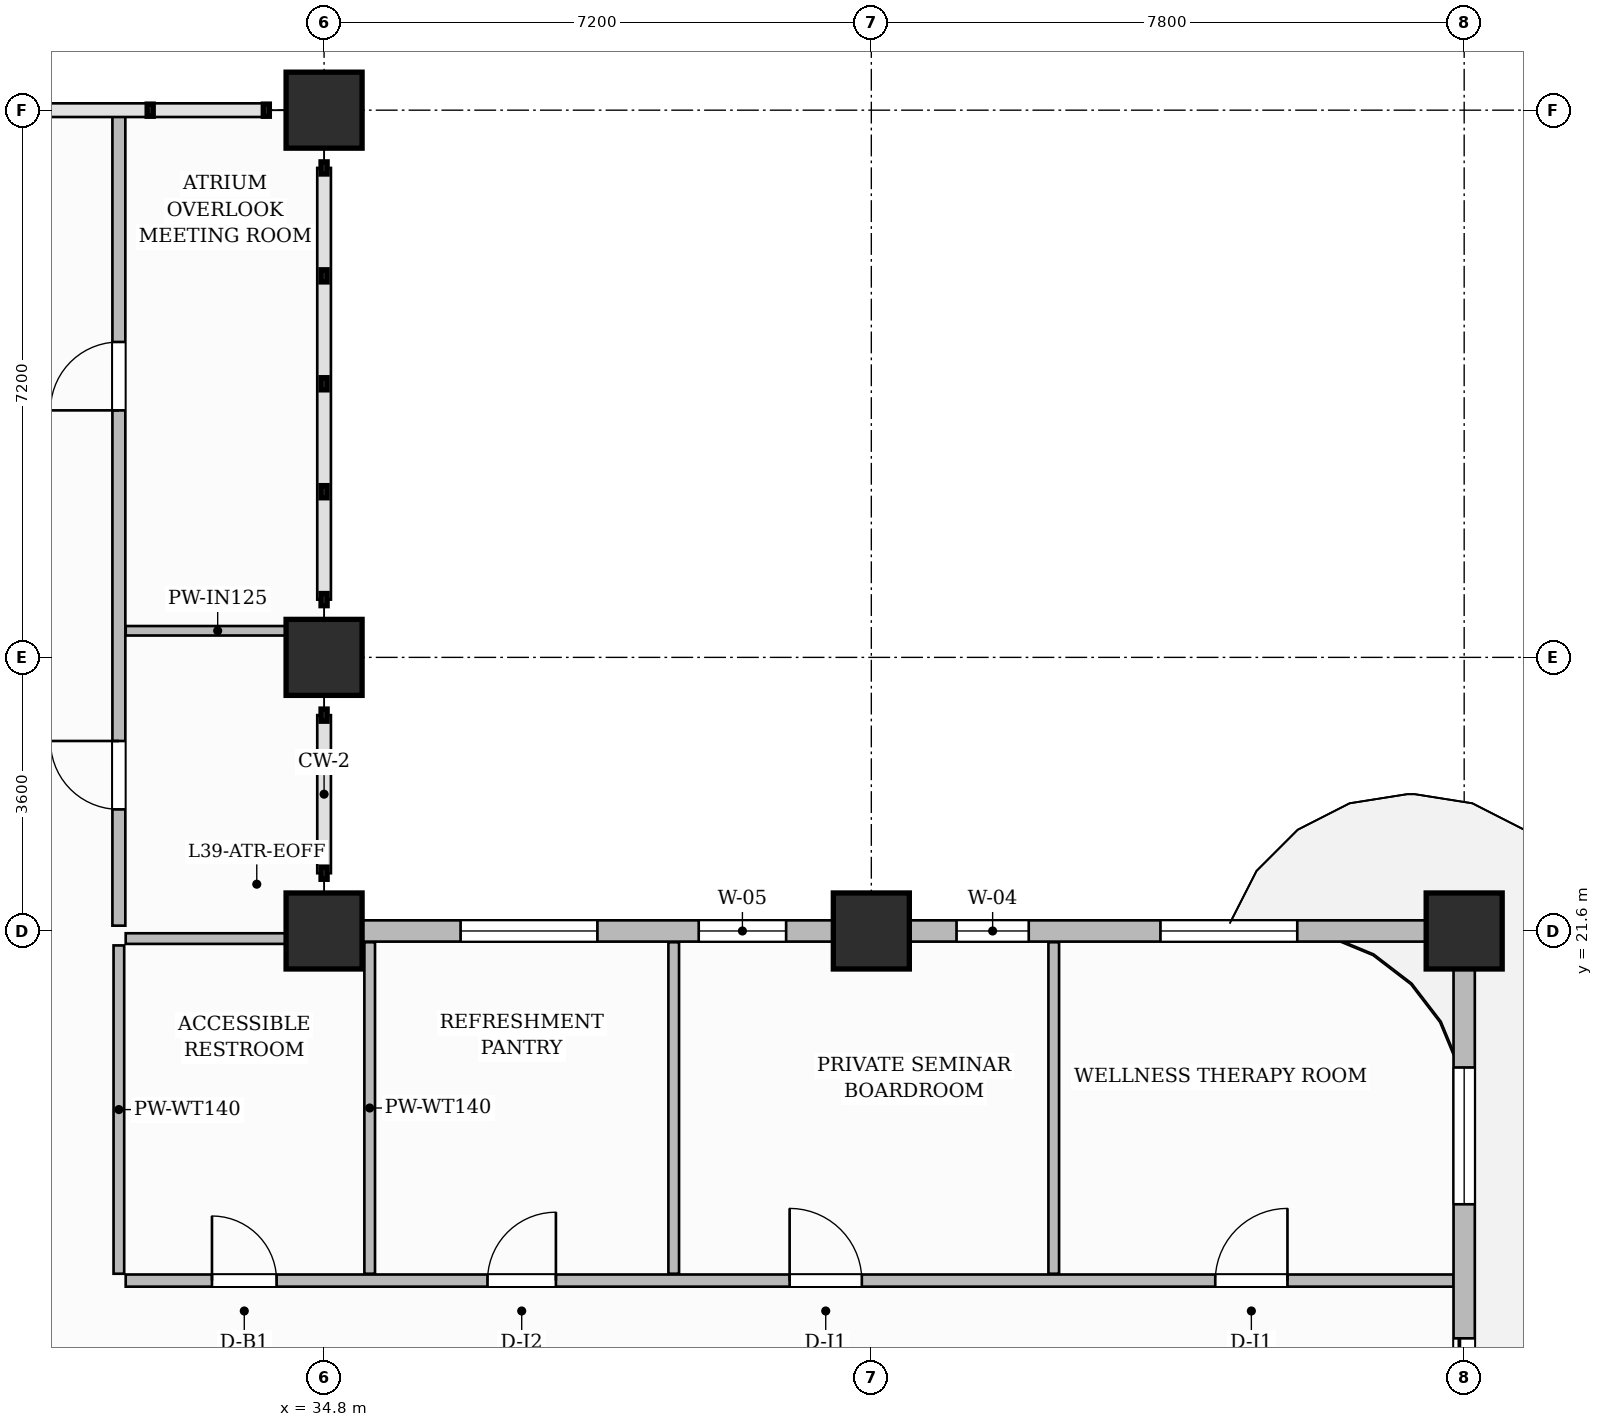
"""IFC4 building model, lengths in metres.
Left out: names, types, materials, properties, quantities, classifications, styles, units other than length and angle.
Written with IfcOpenShell. Run it as: python <this file> out.ifc"""

import sys

from ifc_helpers import new_model, si_unit, direction, frame, frame_2d, origin, origin_2d, place, context, subcontext, project, spatial, rectangle, extrude, source, transform, mapped, element, fill, save


model = new_model("IFC4")
c1 = context("Model", 3, precision=1e-05, world=origin(), true_north=direction((0.0, 1.0)))
c2 = subcontext(c1, "Body", "Model", "MODEL_VIEW")
j1 = project(units=[si_unit("LENGTHUNIT", "METRE"), si_unit("PLANEANGLEUNIT", "RADIAN")], contexts=[c1])
p1 = place(None, origin())
s1 = spatial("IfcSite", under=j1, at=p1, CompositionType="ELEMENT")
p2 = place(p1, origin())
s2 = spatial("IfcBuilding", under=s1, at=p2, CompositionType="ELEMENT")
p3 = place(p2, frame((0.0, 0.0, 158.0)))
s3 = spatial("IfcBuildingStorey", under=s2, at=p3, CompositionType="ELEMENT", Elevation=158.0)
m1 = source(origin(), c2, "Body", "SweptSolid", [
    extrude(rectangle(XDim=1.0, YDim=1.0, at=origin_2d()), origin(), (0.0, 0.0, 1.0), 3.85),
])
for number, where, z_axis, x_axis in (
    (1, (34.8, 21.6, 0.0), (0.0, 0.0, 1.0), (1.0, 0.0, 0.0)),
    (2, (34.8, 25.2, 0.0), (0.0, 0.0, 1.0), (1.0, 0.0, 0.0)),
    (3, (34.8, 32.4, 0.0), (0.0, 0.0, 1.0), (1.0, 0.0, 0.0)),
    (4, (42.0, 21.6, 0.0), (0.0, 0.0, 1.0), (1.0, 0.0, 0.0)),
    (5, (49.8, 21.6, 0.0), (0.0, 0.0, 1.0), (1.0, 0.0, 0.0)),
):
    element("IfcColumn", number, at=place(p3, frame(where, z_axis=z_axis, x_axis=x_axis)), inside=s3, PredefinedType="COLUMN", context=c2, shape_type="MappedRepresentation", body=[
        mapped(m1, transform((0.0, 0.0, 0.0), scale=1.0)),
    ])
p4 = place(p3, frame((32.19, 17.0, 0.0), z_axis=(0.0, 0.0, 1.0), x_axis=(1.0, 0.0, 0.0)))
e6 = element("IfcWall", 6, at=p4, inside=s3, PredefinedType="PARTITIONING", context=c2, shape_type="SweptSolid", body=[
    extrude(rectangle(XDim=17.47, YDim=0.16, at=frame_2d((8.735, 0.0))), origin(), (0.0, 0.0, 1.0), 3.6),
])
p5 = place(p4, frame((1.135, 0.0, 0.0)))
e7 = element("IfcOpeningElement", 7, at=p5, cuts=e6, PredefinedType="OPENING", context=c2, shape_type="SweptSolid", body=[
    extrude(rectangle(XDim=0.85, YDim=2.1, at=frame_2d((0.425, 1.05))), frame((0.0, 0.09, 0.0), z_axis=(0.0, -1.0, 0.0), x_axis=(1.0, 0.0, 0.0)), (0.0, 0.0, 1.0), 0.18),
])
p6 = place(p4, frame((4.76, 0.0, 0.0)))
e8 = element("IfcOpeningElement", 8, at=p6, cuts=e6, PredefinedType="OPENING", context=c2, shape_type="SweptSolid", body=[
    extrude(rectangle(XDim=0.9, YDim=2.15, at=frame_2d((0.45, 1.075))), frame((0.0, 0.09, 0.0), z_axis=(0.0, -1.0, 0.0), x_axis=(1.0, 0.0, 0.0)), (0.0, 0.0, 1.0), 0.18),
])
p7 = place(p4, frame((8.735, 0.0, 0.0)))
e9 = element("IfcOpeningElement", 9, at=p7, cuts=e6, PredefinedType="OPENING", context=c2, shape_type="SweptSolid", body=[
    extrude(rectangle(XDim=0.95, YDim=2.15, at=frame_2d((0.475, 1.075))), frame((0.0, 0.09, 0.0), z_axis=(0.0, -1.0, 0.0), x_axis=(1.0, 0.0, 0.0)), (0.0, 0.0, 1.0), 0.18),
])
p8 = place(p4, frame((14.335, 0.0, 0.0)))
e10 = element("IfcOpeningElement", 10, at=p8, cuts=e6, PredefinedType="OPENING", context=c2, shape_type="SweptSolid", body=[
    extrude(rectangle(XDim=0.95, YDim=2.15, at=frame_2d((0.475, 1.075))), frame((0.0, 0.09, 0.0), z_axis=(0.0, -1.0, 0.0), x_axis=(1.0, 0.0, 0.0)), (0.0, 0.0, 1.0), 0.18),
])
p9 = place(p3, frame((32.1, 17.09, 0.0), z_axis=(0.0, 0.0, 1.0), x_axis=(0.0, 1.0, 0.0)))
e11 = element("IfcWall", 11, at=p9, inside=s3, PredefinedType="PARTITIONING", context=c2, shape_type="SweptSolid", body=[
    extrude(rectangle(XDim=4.32, YDim=0.14, at=frame_2d((2.16, 0.0))), origin(), (0.0, 0.0, 1.0), 3.6),
])
for number, where, z_axis, x_axis in (
    (12, (35.4, 17.09, 0.0), (0.0, 0.0, 1.0), (0.0, 1.0, 0.0)),
    (13, (39.4, 17.09, 0.0), (0.0, 0.0, 1.0), (0.0, 1.0, 0.0)),
    (14, (44.4, 17.09, 0.0), (0.0, 0.0, 1.0), (0.0, 1.0, 0.0)),
):
    element("IfcWall", number, at=place(p3, frame(where, z_axis=z_axis, x_axis=x_axis)), inside=s3, PredefinedType="PARTITIONING", context=c2, shape_type="SweptSolid", body=[
        extrude(rectangle(XDim=4.362, YDim=0.14, at=frame_2d((2.181, 0.0))), origin(), (0.0, 0.0, 1.0), 3.6),
    ])
p10 = place(p3, frame((32.19, 21.5, 0.0), z_axis=(0.0, 0.0, 1.0), x_axis=(1.0, 0.0, 0.0)))
e15 = element("IfcWall", 15, at=p10, inside=s3, PredefinedType="PARTITIONING", context=c2, shape_type="SweptSolid", body=[
    extrude(rectangle(XDim=2.42, YDim=0.14, at=frame_2d((1.21, 0.0))), origin(), (0.0, 0.0, 1.0), 3.085),
])
p11 = place(p3, frame((32.1, 21.67, 0.0), z_axis=(0.0, 0.0, 1.0), x_axis=(0.0, 1.0, 0.0)))
e16 = element("IfcWall", 16, at=p11, inside=s3, PredefinedType="PARTITIONING", context=c2, shape_type="SweptSolid", body=[
    extrude(rectangle(XDim=10.702, YDim=0.17, at=frame_2d((5.351, 0.0))), origin(), (0.0, 0.0, 1.0), 3.6),
])
p12 = place(p11, frame((1.53, 0.0, 0.0)))
e17 = element("IfcOpeningElement", 17, at=p12, cuts=e16, PredefinedType="OPENING", context=c2, shape_type="SweptSolid", body=[
    extrude(rectangle(XDim=0.9, YDim=2.15, at=frame_2d((0.45, 1.075))), frame((0.0, 0.095, 0.0), z_axis=(0.0, -1.0, 0.0), x_axis=(1.0, 0.0, 0.0)), (0.0, 0.0, 1.0), 0.19),
])
p13 = place(p11, frame((6.78, 0.0, 0.0)))
e18 = element("IfcOpeningElement", 18, at=p13, cuts=e16, PredefinedType="OPENING", context=c2, shape_type="SweptSolid", body=[
    extrude(rectangle(XDim=0.9, YDim=2.15, at=frame_2d((0.45, 1.075))), frame((0.0, 0.095, 0.0), z_axis=(0.0, -1.0, 0.0), x_axis=(1.0, 0.0, 0.0)), (0.0, 0.0, 1.0), 0.19),
])
p14 = place(p3, frame((32.19, 25.55, 0.0), z_axis=(0.0, 0.0, 1.0), x_axis=(1.0, 0.0, 0.0)))
e19 = element("IfcWall", 19, at=p14, inside=s3, PredefinedType="PARTITIONING", context=c2, shape_type="SweptSolid", body=[
    extrude(rectangle(XDim=2.42, YDim=0.125, at=frame_2d((1.21, 0.0))), origin(), (0.0, 0.0, 1.0), 3.6),
])
p15 = place(p3, frame((49.8, 14.62, 0.0), z_axis=(0.0, 0.0, 1.0), x_axis=(0.0, 1.0, 0.0)))
e20 = element("IfcWall", 20, at=p15, inside=s3, PredefinedType="SOLIDWALL", context=c2, shape_type="SweptSolid", body=[
    extrude(rectangle(XDim=6.93, YDim=0.28, at=frame_2d((3.465, 0.0))), origin(), (0.0, 0.0, 1.0), 3.085),
])
p16 = place(p15, frame((0.42, 0.0, 0.0)))
e21 = element("IfcOpeningElement", 21, at=p16, cuts=e20, PredefinedType="OPENING", context=c2, shape_type="SweptSolid", body=[
    extrude(rectangle(XDim=1.2, YDim=2.2, at=frame_2d((0.6, 1.1))), frame((0.0, 0.15, 0.0), z_axis=(0.0, -1.0, 0.0), x_axis=(1.0, 0.0, 0.0)), (0.0, 0.0, 1.0), 0.3),
])
p17 = place(p15, frame((3.384, 0.0, 0.8)))
e22 = element("IfcOpeningElement", 22, at=p17, cuts=e20, PredefinedType="OPENING", context=c2, shape_type="SweptSolid", body=[
    extrude(rectangle(XDim=1.8, YDim=1.85, at=frame_2d((0.9, 0.925))), frame((0.0, 0.15, 0.0), z_axis=(0.0, -1.0, 0.0), x_axis=(1.0, 0.0, 0.0)), (0.0, 0.0, 1.0), 0.3),
])
p18 = place(p3, frame((34.8, 21.6, 0.0), z_axis=(0.0, 0.0, 1.0), x_axis=(1.0, 0.0, 0.0)))
e23 = element("IfcWall", 23, at=p18, inside=s3, PredefinedType="SOLIDWALL", context=c2, shape_type="SweptSolid", body=[
    extrude(rectangle(XDim=15.0, YDim=0.28, at=frame_2d((7.5, 0.0))), origin(), (0.0, 0.0, 1.0), 3.085),
])
p19 = place(p18, frame((1.796, 0.0, 0.8)))
e24 = element("IfcOpeningElement", 24, at=p19, cuts=e23, PredefinedType="OPENING", context=c2, shape_type="SweptSolid", body=[
    extrude(rectangle(XDim=1.8, YDim=1.85, at=frame_2d((0.9, 0.925))), frame((0.0, 0.15, 0.0), z_axis=(0.0, -1.0, 0.0), x_axis=(1.0, 0.0, 0.0)), (0.0, 0.0, 1.0), 0.3),
])
p20 = place(p18, frame((4.929, 0.0, 0.8)))
e25 = element("IfcOpeningElement", 25, at=p20, cuts=e23, PredefinedType="OPENING", context=c2, shape_type="SweptSolid", body=[
    extrude(rectangle(XDim=1.15, YDim=1.8, at=frame_2d((0.575, 0.9))), frame((0.0, 0.15, 0.0), z_axis=(0.0, -1.0, 0.0), x_axis=(1.0, 0.0, 0.0)), (0.0, 0.0, 1.0), 0.3),
])
p21 = place(p18, frame((8.321, 0.0, 0.8)))
e26 = element("IfcOpeningElement", 26, at=p21, cuts=e23, PredefinedType="OPENING", context=c2, shape_type="SweptSolid", body=[
    extrude(rectangle(XDim=0.95, YDim=1.75, at=frame_2d((0.475, 0.875))), frame((0.0, 0.15, 0.0), z_axis=(0.0, -1.0, 0.0), x_axis=(1.0, 0.0, 0.0)), (0.0, 0.0, 1.0), 0.3),
])
p22 = place(p18, frame((11.004, 0.0, 0.8)))
e27 = element("IfcOpeningElement", 27, at=p22, cuts=e23, PredefinedType="OPENING", context=c2, shape_type="SweptSolid", body=[
    extrude(rectangle(XDim=1.8, YDim=1.85, at=frame_2d((0.9, 0.925))), frame((0.0, 0.15, 0.0), z_axis=(0.0, -1.0, 0.0), x_axis=(1.0, 0.0, 0.0)), (0.0, 0.0, 1.0), 0.3),
])
m2 = source(origin(), c2, "Body", "SweptSolid", [
    extrude(rectangle(XDim=0.85, YDim=2.1, at=frame_2d((0.425, 1.05))), frame((0.0, 0.025, 0.0), z_axis=(0.0, -1.0, 0.0), x_axis=(1.0, 0.0, 0.0)), (0.0, 0.0, 1.0), 0.05),
])
p23 = place(p5, origin())
e28 = element("IfcDoor", 28, at=p23, inside=s3, OperationType="SINGLE_SWING_LEFT", PredefinedType="DOOR", context=c2, shape_type="MappedRepresentation", body=[
    mapped(m2, transform((0.0, 0.0, 0.0), scale=1.0)),
])
fill(e7, e28)
m3 = source(origin(), c2, "Body", "SweptSolid", [
    extrude(rectangle(XDim=0.9, YDim=2.15, at=frame_2d((0.45, 1.075))), frame((0.0, 0.025, 0.0), z_axis=(0.0, -1.0, 0.0), x_axis=(1.0, 0.0, 0.0)), (0.0, 0.0, 1.0), 0.05),
])
p24 = place(p6, origin())
e29 = element("IfcDoor", 29, at=p24, inside=s3, OperationType="SINGLE_SWING_RIGHT", PredefinedType="DOOR", context=c2, shape_type="MappedRepresentation", body=[
    mapped(m3, transform((0.0, 0.0, 0.0), scale=1.0)),
])
fill(e8, e29)
m4 = source(origin(), c2, "Body", "SweptSolid", [
    extrude(rectangle(XDim=0.95, YDim=2.15, at=frame_2d((0.475, 1.075))), frame((0.0, 0.025, 0.0), z_axis=(0.0, -1.0, 0.0), x_axis=(1.0, 0.0, 0.0)), (0.0, 0.0, 1.0), 0.05),
])
p25 = place(p7, origin())
e30 = element("IfcDoor", 30, at=p25, inside=s3, OperationType="SINGLE_SWING_LEFT", PredefinedType="DOOR", context=c2, shape_type="MappedRepresentation", body=[
    mapped(m4, transform((0.0, 0.0, 0.0), scale=1.0)),
])
fill(e9, e30)
p26 = place(p8, origin())
e31 = element("IfcDoor", 31, at=p26, inside=s3, OperationType="SINGLE_SWING_RIGHT", PredefinedType="DOOR", context=c2, shape_type="MappedRepresentation", body=[
    mapped(m4, transform((0.0, 0.0, 0.0), scale=1.0)),
])
fill(e10, e31)
p27 = place(p12, origin())
e32 = element("IfcDoor", 32, at=p27, inside=s3, OperationType="SINGLE_SWING_RIGHT", PredefinedType="DOOR", context=c2, shape_type="MappedRepresentation", body=[
    mapped(m3, transform((0.0, 0.0, 0.0), scale=1.0)),
])
fill(e17, e32)
p28 = place(p13, origin())
e33 = element("IfcDoor", 33, at=p28, inside=s3, OperationType="SINGLE_SWING_LEFT", PredefinedType="DOOR", context=c2, shape_type="MappedRepresentation", body=[
    mapped(m3, transform((0.0, 0.0, 0.0), scale=1.0)),
])
fill(e18, e33)
m5 = source(origin(), c2, "Body", "SweptSolid", [
    extrude(rectangle(XDim=1.2, YDim=2.2, at=frame_2d((0.6, 1.1))), frame((0.0, 0.025, 0.0), z_axis=(0.0, -1.0, 0.0), x_axis=(1.0, 0.0, 0.0)), (0.0, 0.0, 1.0), 0.05),
])
p29 = place(p16, origin())
e34 = element("IfcDoor", 34, at=p29, inside=s3, OperationType="SLIDING_TO_LEFT", PredefinedType="DOOR", context=c2, shape_type="MappedRepresentation", body=[
    mapped(m5, transform((0.0, 0.0, 0.0), scale=1.0)),
])
fill(e21, e34)
m6 = source(origin(), c2, "Body", "SweptSolid", [
    extrude(rectangle(XDim=1.8, YDim=1.85, at=frame_2d((0.9, 0.925))), frame((0.0, 0.03, 0.0), z_axis=(0.0, -1.0, 0.0), x_axis=(1.0, 0.0, 0.0)), (0.0, 0.0, 1.0), 0.06),
])
p30 = place(p17, origin())
e35 = element("IfcWindow", 35, at=p30, inside=s3, PartitioningType="DOUBLE_PANEL_VERTICAL", PredefinedType="WINDOW", context=c2, shape_type="MappedRepresentation", body=[
    mapped(m6, transform((0.0, 0.0, 0.0), scale=1.0)),
])
fill(e22, e35)
p31 = place(p19, origin())
e36 = element("IfcWindow", 36, at=p31, inside=s3, PartitioningType="DOUBLE_PANEL_VERTICAL", PredefinedType="WINDOW", context=c2, shape_type="MappedRepresentation", body=[
    mapped(m6, transform((0.0, 0.0, 0.0), scale=1.0)),
])
fill(e24, e36)
m7 = source(origin(), c2, "Body", "SweptSolid", [
    extrude(rectangle(XDim=1.15, YDim=1.8, at=frame_2d((0.575, 0.9))), frame((0.0, 0.03, 0.0), z_axis=(0.0, -1.0, 0.0), x_axis=(1.0, 0.0, 0.0)), (0.0, 0.0, 1.0), 0.06),
])
p32 = place(p20, origin())
e37 = element("IfcWindow", 37, at=p32, inside=s3, PartitioningType="SINGLE_PANEL", PredefinedType="WINDOW", context=c2, shape_type="MappedRepresentation", body=[
    mapped(m7, transform((0.0, 0.0, 0.0), scale=1.0)),
])
fill(e25, e37)
m8 = source(origin(), c2, "Body", "SweptSolid", [
    extrude(rectangle(XDim=0.95, YDim=1.75, at=frame_2d((0.475, 0.875))), frame((0.0, 0.03, 0.0), z_axis=(0.0, -1.0, 0.0), x_axis=(1.0, 0.0, 0.0)), (0.0, 0.0, 1.0), 0.06),
])
p33 = place(p21, origin())
e38 = element("IfcWindow", 38, at=p33, inside=s3, PartitioningType="SINGLE_PANEL", PredefinedType="WINDOW", context=c2, shape_type="MappedRepresentation", body=[
    mapped(m8, transform((0.0, 0.0, 0.0), scale=1.0)),
])
fill(e26, e38)
p34 = place(p22, origin())
e39 = element("IfcWindow", 39, at=p34, inside=s3, PartitioningType="DOUBLE_PANEL_VERTICAL", PredefinedType="WINDOW", context=c2, shape_type="MappedRepresentation", body=[
    mapped(m6, transform((0.0, 0.0, 0.0), scale=1.0)),
])
fill(e27, e39)
save(model, sys.argv[1])
